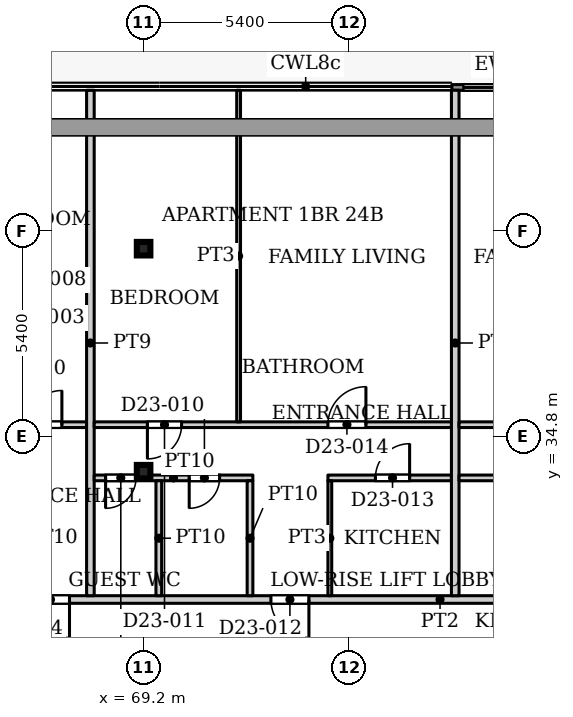
"""IFC4 building model, lengths in metres.
Left out: names, types, materials, properties, quantities, classifications, styles, units other than length and angle.
Written with IfcOpenShell. Run it as: python <this file> out.ifc"""

import sys

from ifc_helpers import new_model, si_unit, direction, frame, frame_2d, origin, origin_2d, place, context, subcontext, project, spatial, rectangle, hollow_rectangle, extrude, source, transform, mapped, element, fill, save


model = new_model("IFC4")
c1 = context("Model", 3, precision=1e-05, world=origin(), true_north=direction((0.0, 1.0)))
c2 = subcontext(c1, "Body", "Model", "MODEL_VIEW")
j1 = project(units=[si_unit("LENGTHUNIT", "METRE"), si_unit("PLANEANGLEUNIT", "RADIAN")], contexts=[c1])
p1 = place(None, origin())
s1 = spatial("IfcSite", under=j1, at=p1, CompositionType="ELEMENT")
p2 = place(p1, origin())
s2 = spatial("IfcBuilding", under=s1, at=p2, CompositionType="ELEMENT")
p3 = place(p2, frame((0.0, 0.0, 105.8)))
s3 = spatial("IfcBuildingStorey", under=s2, at=p3, CompositionType="ELEMENT", Elevation=105.8)
for number, where, z_axis, x_axis in (
    (1, (69.2, 33.863, 0.0), (0.0, 0.0, 1.0), (1.0, 0.0, 0.0)),
    (2, (69.2, 39.732, 0.0), (0.0, 0.0, 1.0), (1.0, 0.0, 0.0)),
):
    element("IfcColumn", number, at=place(p3, frame(where, z_axis=z_axis, x_axis=x_axis)), inside=s3, PredefinedType="COLUMN", context=c2, shape_type="SweptSolid", body=[
        extrude(hollow_rectangle(XDim=0.356, YDim=0.356, WallThickness=0.016, InnerFilletRadius=0.016, OuterFilletRadius=0.032, at=origin_2d()), origin(), (0.0, 0.0, 1.0), 3.9),
    ])
p4 = place(p3, frame((77.312, 43.975, 0.0), z_axis=(0.0, 0.0, 1.0), x_axis=(1.0, 0.0, 0.0)))
e3 = element("IfcWall", 3, at=p4, inside=s3, PredefinedType="SOLIDWALL", context=c2, shape_type="SweptSolid", body=[
    extrude(rectangle(XDim=2.4, YDim=0.15, at=frame_2d((1.2, 0.0))), origin(), (0.0, 0.0, 1.0), 3.75),
])
p5 = place(p4, frame((0.3, 0.0, 0.0)))
e4 = element("IfcOpeningElement", 4, at=p5, cuts=e3, PredefinedType="OPENING", context=c2, shape_type="SweptSolid", body=[
    extrude(rectangle(XDim=1.8, YDim=2.4, at=frame_2d((0.9, 1.2))), frame((0.0, 0.085, 0.0), z_axis=(0.0, -1.0, 0.0), x_axis=(1.0, 0.0, 0.0)), (0.0, 0.0, 1.0), 0.17),
])
p6 = place(p3, frame((55.9, 30.5, 0.0), z_axis=(0.0, 0.0, 1.0), x_axis=(1.0, 0.0, 0.0)))
e5 = element("IfcWall", 5, at=p6, inside=s3, PredefinedType="PARTITIONING", context=c2, shape_type="SweptSolid", body=[
    extrude(rectangle(XDim=42.2, YDim=0.2, at=frame_2d((21.1, 0.0))), origin(), (0.0, 0.0, 1.0), 3.6),
])
p7 = place(p6, frame((10.35, 0.0, 0.0)))
e6 = element("IfcOpeningElement", 6, at=p7, cuts=e5, PredefinedType="OPENING", context=c2, shape_type="SweptSolid", body=[
    extrude(rectangle(XDim=1.0, YDim=2.1, at=frame_2d((0.5, 1.05))), frame((0.0, 0.11, 0.0), z_axis=(0.0, -1.0, 0.0), x_axis=(1.0, 0.0, 0.0)), (0.0, 0.0, 1.0), 0.22),
])
p8 = place(p6, frame((16.65, 0.0, 0.0)))
e7 = element("IfcOpeningElement", 7, at=p8, cuts=e5, PredefinedType="OPENING", context=c2, shape_type="SweptSolid", body=[
    extrude(rectangle(XDim=1.0, YDim=2.1, at=frame_2d((0.5, 1.05))), frame((0.0, 0.11, 0.0), z_axis=(0.0, -1.0, 0.0), x_axis=(1.0, 0.0, 0.0)), (0.0, 0.0, 1.0), 0.22),
])
p9 = place(p6, frame((27.6, 0.0, 0.0)))
e8 = element("IfcOpeningElement", 8, at=p9, cuts=e5, PredefinedType="OPENING", context=c2, shape_type="SweptSolid", body=[
    extrude(rectangle(XDim=1.0, YDim=2.1, at=frame_2d((0.5, 1.05))), frame((0.0, 0.11, 0.0), z_axis=(0.0, -1.0, 0.0), x_axis=(1.0, 0.0, 0.0)), (0.0, 0.0, 1.0), 0.22),
])
p10 = place(p6, frame((36.0, 0.0, 0.0)))
e9 = element("IfcOpeningElement", 9, at=p10, cuts=e5, PredefinedType="OPENING", context=c2, shape_type="SweptSolid", body=[
    extrude(rectangle(XDim=1.0, YDim=2.1, at=frame_2d((0.5, 1.05))), frame((0.0, 0.11, 0.0), z_axis=(0.0, -1.0, 0.0), x_axis=(1.0, 0.0, 0.0)), (0.0, 0.0, 1.0), 0.22),
])
p11 = place(p3, frame((55.9, 35.1, 0.0), z_axis=(0.0, 0.0, 1.0), x_axis=(1.0, 0.0, 0.0)))
e10 = element("IfcWall", 10, at=p11, inside=s3, PredefinedType="PARTITIONING", context=c2, shape_type="SweptSolid", body=[
    extrude(rectangle(XDim=11.8, YDim=0.15, at=frame_2d((5.9, 0.0))), origin(), (0.0, 0.0, 1.0), 3.6),
])
p12 = place(p11, frame((0.8, 0.0, 0.0)))
e11 = element("IfcOpeningElement", 11, at=p12, cuts=e10, PredefinedType="OPENING", context=c2, shape_type="SweptSolid", body=[
    extrude(rectangle(XDim=0.9, YDim=2.1, at=frame_2d((0.45, 1.05))), frame((0.0, 0.085, 0.0), z_axis=(0.0, -1.0, 0.0), x_axis=(1.0, 0.0, 0.0)), (0.0, 0.0, 1.0), 0.17),
])
p13 = place(p11, frame((4.5, 0.0, 0.0)))
e12 = element("IfcOpeningElement", 12, at=p13, cuts=e10, PredefinedType="OPENING", context=c2, shape_type="SweptSolid", body=[
    extrude(rectangle(XDim=1.0, YDim=2.1, at=frame_2d((0.5, 1.05))), frame((0.0, 0.085, 0.0), z_axis=(0.0, -1.0, 0.0), x_axis=(1.0, 0.0, 0.0)), (0.0, 0.0, 1.0), 0.17),
])
p14 = place(p11, frame((10.25, 0.0, 0.0)))
e13 = element("IfcOpeningElement", 13, at=p14, cuts=e10, PredefinedType="OPENING", context=c2, shape_type="SweptSolid", body=[
    extrude(rectangle(XDim=0.9, YDim=2.1, at=frame_2d((0.45, 1.05))), frame((0.0, 0.085, 0.0), z_axis=(0.0, -1.0, 0.0), x_axis=(1.0, 0.0, 0.0)), (0.0, 0.0, 1.0), 0.17),
])
p15 = place(p3, frame((67.8, 30.6, 0.0), z_axis=(0.0, 0.0, 1.0), x_axis=(0.0, 1.0, 0.0)))
e14 = element("IfcWall", 14, at=p15, inside=s3, PredefinedType="PARTITIONING", context=c2, shape_type="SweptSolid", body=[
    extrude(rectangle(XDim=13.3, YDim=0.2, at=frame_2d((6.65, 0.0))), origin(), (0.0, 0.0, 1.0), 3.6),
])
p16 = place(p3, frame((67.9, 33.7, 0.0), z_axis=(0.0, 0.0, 1.0), x_axis=(1.0, 0.0, 0.0)))
e15 = element("IfcWall", 15, at=p16, inside=s3, PredefinedType="PARTITIONING", context=c2, shape_type="SweptSolid", body=[
    extrude(rectangle(XDim=4.175, YDim=0.15, at=frame_2d((2.087, 0.0))), origin(), (0.0, 0.0, 1.0), 3.6),
])
p17 = place(p16, frame((2.5, 0.0, 0.0)))
e16 = element("IfcOpeningElement", 16, at=p17, cuts=e15, PredefinedType="OPENING", context=c2, shape_type="SweptSolid", body=[
    extrude(rectangle(XDim=0.8, YDim=2.1, at=frame_2d((0.4, 1.05))), frame((0.0, 0.085, 0.0), z_axis=(0.0, -1.0, 0.0), x_axis=(1.0, 0.0, 0.0)), (0.0, 0.0, 1.0), 0.17),
])
p18 = place(p16, frame((0.3, 0.0, 0.0)))
e17 = element("IfcOpeningElement", 17, at=p18, cuts=e15, PredefinedType="OPENING", context=c2, shape_type="SweptSolid", body=[
    extrude(rectangle(XDim=0.8, YDim=2.1, at=frame_2d((0.4, 1.05))), frame((0.0, 0.085, 0.0), z_axis=(0.0, -1.0, 0.0), x_axis=(1.0, 0.0, 0.0)), (0.0, 0.0, 1.0), 0.17),
])
p19 = place(p3, frame((67.9, 35.1, 0.0), z_axis=(0.0, 0.0, 1.0), x_axis=(1.0, 0.0, 0.0)))
e18 = element("IfcWall", 18, at=p19, inside=s3, PredefinedType="PARTITIONING", context=c2, shape_type="SweptSolid", body=[
    extrude(rectangle(XDim=9.4, YDim=0.15, at=frame_2d((4.7, 0.0))), origin(), (0.0, 0.0, 1.0), 3.6),
])
p20 = place(p19, frame((1.4, 0.0, 0.0)))
e19 = element("IfcOpeningElement", 19, at=p20, cuts=e18, PredefinedType="OPENING", context=c2, shape_type="SweptSolid", body=[
    extrude(rectangle(XDim=0.9, YDim=2.1, at=frame_2d((0.45, 1.05))), frame((0.0, 0.085, 0.0), z_axis=(0.0, -1.0, 0.0), x_axis=(1.0, 0.0, 0.0)), (0.0, 0.0, 1.0), 0.17),
])
p21 = place(p19, frame((6.15, 0.0, 0.0)))
e20 = element("IfcOpeningElement", 20, at=p21, cuts=e18, PredefinedType="OPENING", context=c2, shape_type="SweptSolid", body=[
    extrude(rectangle(XDim=1.0, YDim=2.1, at=frame_2d((0.5, 1.05))), frame((0.0, 0.085, 0.0), z_axis=(0.0, -1.0, 0.0), x_axis=(1.0, 0.0, 0.0)), (0.0, 0.0, 1.0), 0.17),
])
p22 = place(p3, frame((69.6, 30.6, 0.0), z_axis=(0.0, 0.0, 1.0), x_axis=(0.0, 1.0, 0.0)))
e21 = element("IfcWall", 21, at=p22, inside=s3, PredefinedType="PARTITIONING", context=c2, shape_type="SweptSolid", body=[
    extrude(rectangle(XDim=3.025, YDim=0.15, at=frame_2d((1.512, 0.0))), origin(), (0.0, 0.0, 1.0), 3.6),
])
p23 = place(p3, frame((71.7, 35.175, 0.0), z_axis=(0.0, 0.0, 1.0), x_axis=(0.0, 1.0, 0.0)))
e22 = element("IfcWall", 22, at=p23, inside=s3, PredefinedType="PARTITIONING", context=c2, shape_type="SweptSolid", body=[
    extrude(rectangle(XDim=8.725, YDim=0.1, at=frame_2d((4.362, 0.0))), origin(), (0.0, 0.0, 1.0), 3.6),
])
p24 = place(p3, frame((72.0, 30.6, 0.0), z_axis=(0.0, 0.0, 1.0), x_axis=(0.0, 1.0, 0.0)))
e23 = element("IfcWall", 23, at=p24, inside=s3, PredefinedType="PARTITIONING", context=c2, shape_type="SweptSolid", body=[
    extrude(rectangle(XDim=3.025, YDim=0.15, at=frame_2d((1.512, 0.0))), origin(), (0.0, 0.0, 1.0), 3.6),
])
p25 = place(p3, frame((74.05, 33.7, 0.0), z_axis=(0.0, 0.0, 1.0), x_axis=(1.0, 0.0, 0.0)))
e24 = element("IfcWall", 24, at=p25, inside=s3, PredefinedType="PARTITIONING", context=c2, shape_type="SweptSolid", body=[
    extrude(rectangle(XDim=3.25, YDim=0.15, at=frame_2d((1.625, 0.0))), origin(), (0.0, 0.0, 1.0), 3.6),
])
p26 = place(p25, frame((1.25, 0.0, 0.0)))
e25 = element("IfcOpeningElement", 25, at=p26, cuts=e24, PredefinedType="OPENING", context=c2, shape_type="SweptSolid", body=[
    extrude(rectangle(XDim=0.9, YDim=2.1, at=frame_2d((0.45, 1.05))), frame((0.0, 0.085, 0.0), z_axis=(0.0, -1.0, 0.0), x_axis=(1.0, 0.0, 0.0)), (0.0, 0.0, 1.0), 0.17),
])
p27 = place(p3, frame((74.1, 30.6, 0.0), z_axis=(0.0, 0.0, 1.0), x_axis=(0.0, 1.0, 0.0)))
e26 = element("IfcWall", 26, at=p27, inside=s3, PredefinedType="PARTITIONING", context=c2, shape_type="SweptSolid", body=[
    extrude(rectangle(XDim=3.025, YDim=0.1, at=frame_2d((1.512, 0.0))), origin(), (0.0, 0.0, 1.0), 3.6),
])
p28 = place(p3, frame((77.4, 30.6, 0.0), z_axis=(0.0, 0.0, 1.0), x_axis=(0.0, 1.0, 0.0)))
e27 = element("IfcWall", 27, at=p28, inside=s3, PredefinedType="PARTITIONING", context=c2, shape_type="SweptSolid", body=[
    extrude(rectangle(XDim=13.3, YDim=0.2, at=frame_2d((6.65, 0.0))), origin(), (0.0, 0.0, 1.0), 3.6),
])
p29 = place(p3, frame((77.5, 33.7, 0.0), z_axis=(0.0, 0.0, 1.0), x_axis=(1.0, 0.0, 0.0)))
e28 = element("IfcWall", 28, at=p29, inside=s3, PredefinedType="PARTITIONING", context=c2, shape_type="SweptSolid", body=[
    extrude(rectangle(XDim=5.375, YDim=0.15, at=frame_2d((2.688, 0.0))), origin(), (0.0, 0.0, 1.0), 3.6),
])
p30 = place(p29, frame((1.25, 0.0, 0.0)))
e29 = element("IfcOpeningElement", 29, at=p30, cuts=e28, PredefinedType="OPENING", context=c2, shape_type="SweptSolid", body=[
    extrude(rectangle(XDim=0.9, YDim=2.1, at=frame_2d((0.45, 1.05))), frame((0.0, 0.085, 0.0), z_axis=(0.0, -1.0, 0.0), x_axis=(1.0, 0.0, 0.0)), (0.0, 0.0, 1.0), 0.17),
])
p31 = place(p29, frame((4.0, 0.0, 0.0)))
e30 = element("IfcOpeningElement", 30, at=p31, cuts=e28, PredefinedType="OPENING", context=c2, shape_type="SweptSolid", body=[
    extrude(rectangle(XDim=0.8, YDim=2.1, at=frame_2d((0.4, 1.05))), frame((0.0, 0.085, 0.0), z_axis=(0.0, -1.0, 0.0), x_axis=(1.0, 0.0, 0.0)), (0.0, 0.0, 1.0), 0.17),
])
p32 = place(p3, frame((77.5, 35.1, 0.0), z_axis=(0.0, 0.0, 1.0), x_axis=(1.0, 0.0, 0.0)))
e31 = element("IfcWall", 31, at=p32, inside=s3, PredefinedType="PARTITIONING", context=c2, shape_type="SweptSolid", body=[
    extrude(rectangle(XDim=10.0, YDim=0.15, at=frame_2d((5.0, 0.0))), origin(), (0.0, 0.0, 1.0), 3.6),
])
p33 = place(p32, frame((7.9, 0.0, 0.0)))
e32 = element("IfcOpeningElement", 32, at=p33, cuts=e31, PredefinedType="OPENING", context=c2, shape_type="SweptSolid", body=[
    extrude(rectangle(XDim=0.9, YDim=2.1, at=frame_2d((0.45, 1.05))), frame((0.0, 0.085, 0.0), z_axis=(0.0, -1.0, 0.0), x_axis=(1.0, 0.0, 0.0)), (0.0, 0.0, 1.0), 0.17),
])
p34 = place(p32, frame((2.55, 0.0, 0.0)))
e33 = element("IfcOpeningElement", 33, at=p34, cuts=e31, PredefinedType="OPENING", context=c2, shape_type="SweptSolid", body=[
    extrude(rectangle(XDim=1.0, YDim=2.1, at=frame_2d((0.5, 1.05))), frame((0.0, 0.085, 0.0), z_axis=(0.0, -1.0, 0.0), x_axis=(1.0, 0.0, 0.0)), (0.0, 0.0, 1.0), 0.17),
])
m1 = source(origin(), c2, "Body", "SweptSolid", [
    extrude(rectangle(XDim=1.8, YDim=2.4, at=frame_2d((0.9, 1.2))), frame((0.0, 0.025, 0.0), z_axis=(0.0, -1.0, 0.0), x_axis=(1.0, 0.0, 0.0)), (0.0, 0.0, 1.0), 0.05),
])
p35 = place(p5, origin())
e34 = element("IfcDoor", 34, at=p35, inside=s3, OperationType="SLIDING_TO_LEFT", PredefinedType="DOOR", context=c2, shape_type="MappedRepresentation", body=[
    mapped(m1, transform((0.0, 0.0, 0.0), x_axis=(1.0, 0.0, 0.0), y_axis=(0.0, 1.0, 0.0), z_axis=(0.0, 0.0, 1.0), scale=1.0)),
])
fill(e4, e34)
m2 = source(origin(), c2, "Body", "SweptSolid", [
    extrude(rectangle(XDim=1.0, YDim=2.1, at=frame_2d((0.5, 1.05))), frame((0.0, 0.025, 0.0), z_axis=(0.0, -1.0, 0.0), x_axis=(1.0, 0.0, 0.0)), (0.0, 0.0, 1.0), 0.05),
])
p36 = place(p7, origin())
e35 = element("IfcDoor", 35, at=p36, inside=s3, OperationType="SINGLE_SWING_RIGHT", PredefinedType="DOOR", context=c2, shape_type="MappedRepresentation", body=[
    mapped(m2, transform((0.0, 0.0, 0.0), x_axis=(1.0, 0.0, 0.0), y_axis=(0.0, 1.0, 0.0), z_axis=(0.0, 0.0, 1.0), scale=1.0)),
])
fill(e6, e35)
m3 = source(origin(), c2, "Body", "SweptSolid", [
    extrude(rectangle(XDim=0.9, YDim=2.1, at=frame_2d((0.45, 1.05))), frame((0.0, 0.025, 0.0), z_axis=(0.0, -1.0, 0.0), x_axis=(1.0, 0.0, 0.0)), (0.0, 0.0, 1.0), 0.05),
])
p37 = place(p14, origin())
e36 = element("IfcDoor", 36, at=p37, inside=s3, OperationType="SINGLE_SWING_LEFT", PredefinedType="DOOR", context=c2, shape_type="MappedRepresentation", body=[
    mapped(m3, transform((0.0, 0.0, 0.0), x_axis=(1.0, 0.0, 0.0), y_axis=(0.0, 1.0, 0.0), z_axis=(0.0, 0.0, 1.0), scale=1.0)),
])
fill(e13, e36)
m4 = source(origin(), c2, "Body", "SweptSolid", [
    extrude(rectangle(XDim=0.8, YDim=2.1, at=frame_2d((0.4, 1.05))), frame((0.0, 0.025, 0.0), z_axis=(0.0, -1.0, 0.0), x_axis=(1.0, 0.0, 0.0)), (0.0, 0.0, 1.0), 0.05),
])
p38 = place(p17, origin())
e37 = element("IfcDoor", 37, at=p38, inside=s3, OperationType="SINGLE_SWING_RIGHT", PredefinedType="DOOR", context=c2, shape_type="MappedRepresentation", body=[
    mapped(m4, transform((0.0, 0.0, 0.0), x_axis=(1.0, 0.0, 0.0), y_axis=(0.0, 1.0, 0.0), z_axis=(0.0, 0.0, 1.0), scale=1.0)),
])
fill(e16, e37)
p39 = place(p20, origin())
e38 = element("IfcDoor", 38, at=p39, inside=s3, OperationType="SINGLE_SWING_RIGHT", PredefinedType="DOOR", context=c2, shape_type="MappedRepresentation", body=[
    mapped(m3, transform((0.0, 0.0, 0.0), x_axis=(1.0, 0.0, 0.0), y_axis=(0.0, 1.0, 0.0), z_axis=(0.0, 0.0, 1.0), scale=1.0)),
])
fill(e19, e38)
p40 = place(p8, origin())
e39 = element("IfcDoor", 39, at=p40, inside=s3, OperationType="SINGLE_SWING_RIGHT", PredefinedType="DOOR", context=c2, shape_type="MappedRepresentation", body=[
    mapped(m2, transform((0.0, 0.0, 0.0), x_axis=(1.0, 0.0, 0.0), y_axis=(0.0, 1.0, 0.0), z_axis=(0.0, 0.0, 1.0), scale=1.0)),
])
fill(e7, e39)
p41 = place(p26, origin())
e40 = element("IfcDoor", 40, at=p41, inside=s3, OperationType="SINGLE_SWING_LEFT", PredefinedType="DOOR", context=c2, shape_type="MappedRepresentation", body=[
    mapped(m3, transform((0.0, 0.0, 0.0), x_axis=(1.0, 0.0, 0.0), y_axis=(0.0, 1.0, 0.0), z_axis=(0.0, 0.0, 1.0), scale=1.0)),
])
fill(e25, e40)
m5 = source(origin(), c2, "Body", "SweptSolid", [
    extrude(rectangle(XDim=1.0, YDim=2.1, at=frame_2d((0.5, 1.05))), frame((0.0, 0.025, 0.0), z_axis=(0.0, -1.0, 0.0), x_axis=(1.0, 0.0, 0.0)), (0.0, 0.0, 1.0), 0.05),
])
p42 = place(p21, origin())
e41 = element("IfcDoor", 41, at=p42, inside=s3, OperationType="SINGLE_SWING_LEFT", PredefinedType="DOOR", context=c2, shape_type="MappedRepresentation", body=[
    mapped(m5, transform((0.0, 0.0, 0.0), x_axis=(1.0, 0.0, 0.0), y_axis=(0.0, 1.0, 0.0), z_axis=(0.0, 0.0, 1.0), scale=1.0)),
])
fill(e20, e41)
p43 = place(p18, origin())
e42 = element("IfcDoor", 42, at=p43, inside=s3, OperationType="SINGLE_SWING_RIGHT", PredefinedType="DOOR", context=c2, shape_type="MappedRepresentation", body=[
    mapped(m4, transform((0.0, 0.0, 0.0), x_axis=(1.0, 0.0, 0.0), y_axis=(0.0, 1.0, 0.0), z_axis=(0.0, 0.0, 1.0), scale=1.0)),
])
fill(e17, e42)
save(model, sys.argv[1])
